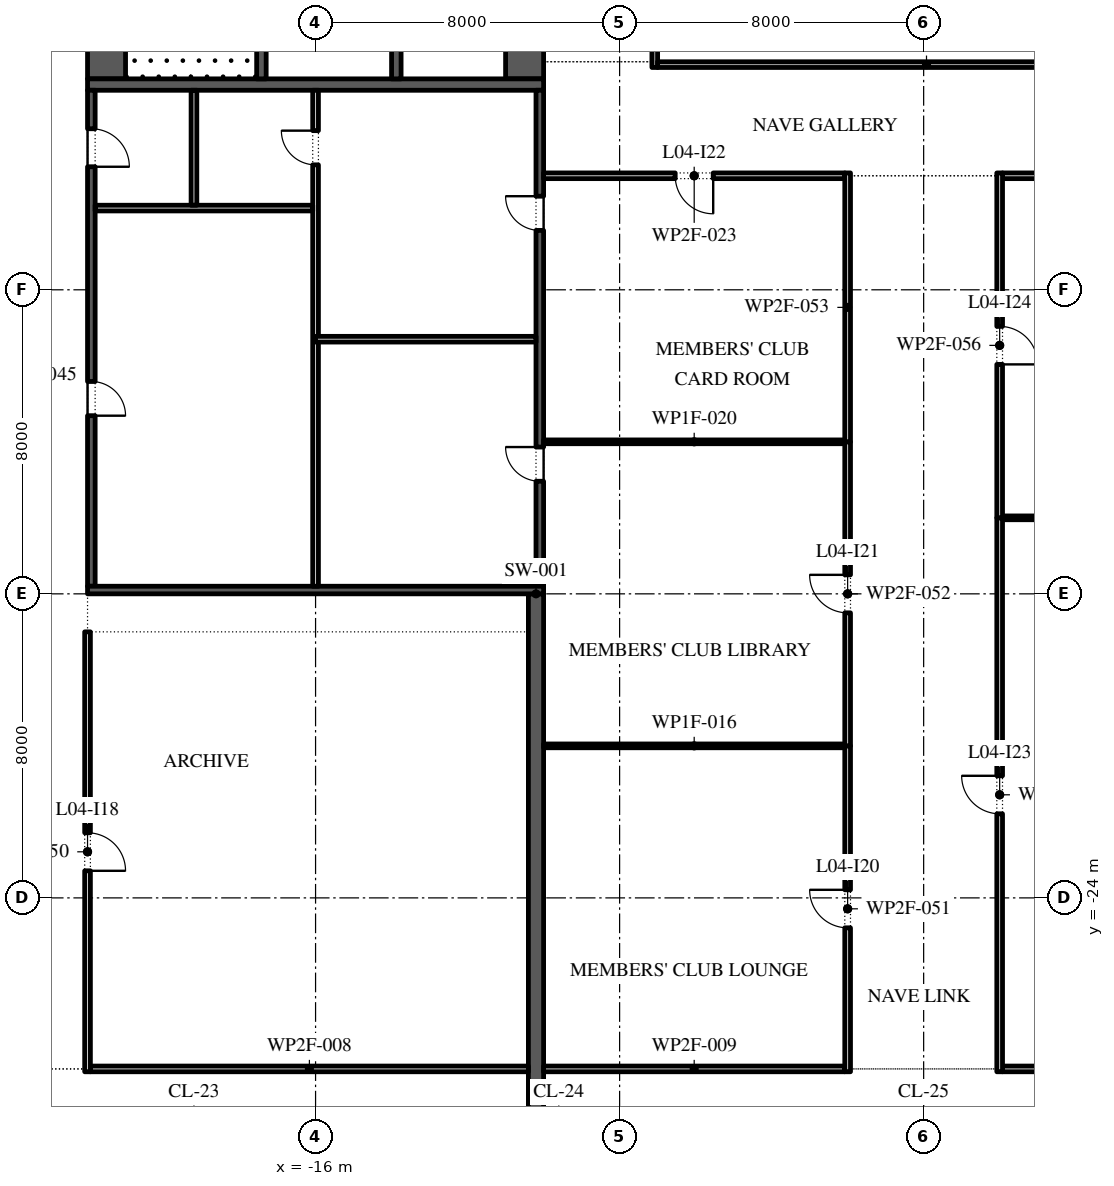
"""IFC4 building model, lengths in metres.
Left out: names, types, materials, properties, quantities, classifications, styles, units other than length and angle.
Written with IfcOpenShell. Run it as: python <this file> out.ifc"""

import sys

from ifc_helpers import new_model, si_unit, direction, frame, frame_2d, origin, place, context, subcontext, project, spatial, rectangle, extrude, element, fill, save


model = new_model("IFC4")
c1 = context("Model", 3, precision=1e-05, world=origin(), true_north=direction((0.0, 1.0)))
c2 = subcontext(c1, "Body", "Model", "MODEL_VIEW")
j1 = project(units=[si_unit("LENGTHUNIT", "METRE"), si_unit("PLANEANGLEUNIT", "RADIAN")], contexts=[c1])
p1 = place(None, origin())
s1 = spatial("IfcSite", under=j1, at=p1, CompositionType="ELEMENT")
p2 = place(p1, origin())
s2 = spatial("IfcBuilding", under=s1, at=p2, CompositionType="ELEMENT")
p3 = place(p2, frame((0.0, 0.0, 24.0)))
s3 = spatial("IfcBuildingStorey", under=s2, at=p3, CompositionType="ELEMENT", Elevation=24.0)
p4 = place(p3, frame((-10.2, -31.0, 0.0), z_axis=(0.0, 0.0, 1.0), x_axis=(0.0, 1.0, 0.0)))
e1 = element("IfcWall", 1, at=p4, inside=s3, PredefinedType="SHEAR", context=c2, shape_type="SweptSolid", body=[
    extrude(rectangle(XDim=15.0, YDim=0.4, at=frame_2d((7.5, 0.0))), origin(), (0.0, 0.0, 1.0), 4.5),
])
p5 = place(p3, frame((-7.075, -2.15, 0.0), z_axis=(0.0, 0.0, 1.0), x_axis=(0.0, 1.0, 0.0)))
e2 = element("IfcWall", 2, at=p5, inside=s3, PredefinedType="STANDARD", context=c2, shape_type="SweptSolid", body=[
    extrude(rectangle(XDim=18.3, YDim=0.15, at=frame_2d((9.15, 0.0))), origin(), (0.0, 0.0, 1.0), 4.5),
])
p6 = place(p3, frame((7.15, -2.075, 0.0), z_axis=(0.0, 0.0, 1.0), x_axis=(-1.0, 0.0, 0.0)))
e3 = element("IfcWall", 3, at=p6, inside=s3, PredefinedType="STANDARD", context=c2, shape_type="SweptSolid", body=[
    extrude(rectangle(XDim=14.15, YDim=0.15, at=frame_2d((7.075, 0.0))), origin(), (0.0, 0.0, 1.0), 3.52),
])
p7 = place(p3, frame((-21.5, -2.45, 0.0), z_axis=(0.0, 0.0, 1.0), x_axis=(0.0, 1.0, 0.0)))
e4 = element("IfcWall", 4, at=p7, inside=s3, PredefinedType="SHEAR", context=c2, shape_type="SweptSolid", body=[
    extrude(rectangle(XDim=27.9, YDim=1.0, at=frame_2d((13.95, 0.0))), origin(), (0.0, 0.0, 1.0), 4.5),
])
p8 = place(p7, frame((5.05, 0.0, 0.0)))
e5 = element("IfcOpeningElement", 5, at=p8, cuts=e4, PredefinedType="OPENING", context=c2, shape_type="SweptSolid", body=[
    extrude(rectangle(XDim=1.2, YDim=2.1, at=frame_2d((0.6, 1.05))), frame((0.0, 0.51, 0.0), z_axis=(0.0, -1.0, 0.0), x_axis=(1.0, 0.0, 0.0)), (0.0, 0.0, 1.0), 1.02),
])
p9 = place(p7, frame((21.65, 0.0, 0.0)))
e6 = element("IfcOpeningElement", 6, at=p9, cuts=e4, PredefinedType="OPENING", context=c2, shape_type="SweptSolid", body=[
    extrude(rectangle(XDim=1.2, YDim=2.1, at=frame_2d((0.6, 1.05))), frame((0.0, 0.51, 0.0), z_axis=(0.0, -1.0, 0.0), x_axis=(1.0, 0.0, 0.0)), (0.0, 0.0, 1.0), 1.02),
])
p10 = place(p3, frame((-10.5, -2.45, 0.0), z_axis=(0.0, 0.0, 1.0), x_axis=(0.0, 1.0, 0.0)))
e7 = element("IfcWall", 7, at=p10, inside=s3, PredefinedType="SHEAR", context=c2, shape_type="SweptSolid", body=[
    extrude(rectangle(XDim=27.9, YDim=1.0, at=frame_2d((13.95, 0.0))), origin(), (0.0, 0.0, 1.0), 4.5),
])
p11 = place(p10, frame((23.65, 0.0, 0.0)))
e8 = element("IfcOpeningElement", 8, at=p11, cuts=e7, PredefinedType="OPENING", context=c2, shape_type="SweptSolid", body=[
    extrude(rectangle(XDim=2.4, YDim=2.1, at=frame_2d((1.2, 1.05))), frame((0.0, 0.51, 0.0), z_axis=(0.0, -1.0, 0.0), x_axis=(1.0, 0.0, 0.0)), (0.0, 0.0, 1.0), 1.02),
])
p12 = place(p10, frame((1.087, 0.0, 0.0)))
e9 = element("IfcOpeningElement", 9, at=p12, cuts=e7, PredefinedType="OPENING", context=c2, shape_type="SweptSolid", body=[
    extrude(rectangle(XDim=0.9, YDim=2.1, at=frame_2d((0.45, 1.05))), frame((0.0, 0.51, 0.0), z_axis=(0.0, -1.0, 0.0), x_axis=(1.0, 0.0, 0.0)), (0.0, 0.0, 1.0), 1.02),
])
p13 = place(p10, frame((4.312, 0.0, 0.0)))
e10 = element("IfcOpeningElement", 10, at=p13, cuts=e7, PredefinedType="OPENING", context=c2, shape_type="SweptSolid", body=[
    extrude(rectangle(XDim=0.9, YDim=2.1, at=frame_2d((0.45, 1.05))), frame((0.0, 0.51, 0.0), z_axis=(0.0, -1.0, 0.0), x_axis=(1.0, 0.0, 0.0)), (0.0, 0.0, 1.0), 1.02),
])
p14 = place(p3, frame((-22.0, -2.6, 0.0), z_axis=(0.0, 0.0, 1.0), x_axis=(1.0, 0.0, 0.0)))
e11 = element("IfcWall", 11, at=p14, inside=s3, PredefinedType="SHEAR", context=c2, shape_type="SweptSolid", body=[
    extrude(rectangle(XDim=12.0, YDim=0.3, at=frame_2d((6.0, 0.0))), origin(), (0.0, 0.0, 1.0), 4.5),
])
p15 = place(p3, frame((-17.425, -2.45, 0.0), z_axis=(0.0, 0.0, 1.0), x_axis=(0.0, 1.0, 0.0)))
e12 = element("IfcWall", 12, at=p15, inside=s3, PredefinedType="SHEAR", context=c2, shape_type="SweptSolid", body=[
    extrude(rectangle(XDim=6.3, YDim=0.25, at=frame_2d((3.15, 0.0))), origin(), (0.0, 0.0, 1.0), 4.5),
])
p16 = place(p15, frame((5.05, 0.0, 0.0)))
e13 = element("IfcOpeningElement", 13, at=p16, cuts=e12, PredefinedType="OPENING", context=c2, shape_type="SweptSolid", body=[
    extrude(rectangle(XDim=1.2, YDim=2.1, at=frame_2d((0.6, 1.05))), frame((0.0, 0.135, 0.0), z_axis=(0.0, -1.0, 0.0), x_axis=(1.0, 0.0, 0.0)), (0.0, 0.0, 1.0), 0.27),
])
p17 = place(p3, frame((-13.875, -2.45, 0.0), z_axis=(0.0, 0.0, 1.0), x_axis=(0.0, 1.0, 0.0)))
e14 = element("IfcWall", 14, at=p17, inside=s3, PredefinedType="SHEAR", context=c2, shape_type="SweptSolid", body=[
    extrude(rectangle(XDim=21.3, YDim=0.25, at=frame_2d((10.65, 0.0))), origin(), (0.0, 0.0, 1.0), 4.5),
])
p18 = place(p17, frame((14.571, 0.0, 0.0)))
e15 = element("IfcOpeningElement", 15, at=p18, cuts=e14, PredefinedType="OPENING", context=c2, shape_type="SweptSolid", body=[
    extrude(rectangle(XDim=0.9, YDim=2.1, at=frame_2d((0.45, 1.05))), frame((0.0, 0.135, 0.0), z_axis=(0.0, -1.0, 0.0), x_axis=(1.0, 0.0, 0.0)), (0.0, 0.0, 1.0), 0.27),
])
p19 = place(p17, frame((6.971, 0.0, 0.0)))
e16 = element("IfcOpeningElement", 16, at=p19, cuts=e14, PredefinedType="OPENING", context=c2, shape_type="SweptSolid", body=[
    extrude(rectangle(XDim=1.1, YDim=2.1, at=frame_2d((0.55, 1.05))), frame((0.0, 0.135, 0.0), z_axis=(0.0, -1.0, 0.0), x_axis=(1.0, 0.0, 0.0)), (0.0, 0.0, 1.0), 0.27),
])
p20 = place(p3, frame((-21.9, -15.8, 0.0), z_axis=(0.0, 0.0, 1.0), x_axis=(0.0, 1.0, 0.0)))
e17 = element("IfcWall", 17, at=p20, inside=s3, PredefinedType="SHEAR", context=c2, shape_type="SweptSolid", body=[
    extrude(rectangle(XDim=13.05, YDim=0.2, at=frame_2d((6.525, 0.0))), origin(), (0.0, 0.0, 1.0), 4.5),
])
p21 = place(p20, frame((4.488, 0.0, 0.0)))
e18 = element("IfcOpeningElement", 18, at=p21, cuts=e17, PredefinedType="OPENING", context=c2, shape_type="SweptSolid", body=[
    extrude(rectangle(XDim=0.9, YDim=2.1, at=frame_2d((0.45, 1.05))), frame((0.0, 0.11, 0.0), z_axis=(0.0, -1.0, 0.0), x_axis=(1.0, 0.0, 0.0)), (0.0, 0.0, 1.0), 0.22),
])
p22 = place(p20, frame((11.038, 0.0, 0.0)))
e19 = element("IfcOpeningElement", 19, at=p22, cuts=e17, PredefinedType="OPENING", context=c2, shape_type="SweptSolid", body=[
    extrude(rectangle(XDim=1.0, YDim=2.1, at=frame_2d((0.5, 1.05))), frame((0.0, 0.11, 0.0), z_axis=(0.0, -1.0, 0.0), x_axis=(1.0, 0.0, 0.0)), (0.0, 0.0, 1.0), 0.22),
])
p23 = place(p3, frame((-10.1, -15.8, 0.0), z_axis=(0.0, 0.0, 1.0), x_axis=(0.0, 1.0, 0.0)))
e20 = element("IfcWall", 20, at=p23, inside=s3, PredefinedType="SHEAR", context=c2, shape_type="SweptSolid", body=[
    extrude(rectangle(XDim=13.05, YDim=0.2, at=frame_2d((6.525, 0.0))), origin(), (0.0, 0.0, 1.0), 4.5),
])
p24 = place(p23, frame((2.762, 0.0, 0.0)))
e21 = element("IfcOpeningElement", 21, at=p24, cuts=e20, PredefinedType="OPENING", context=c2, shape_type="SweptSolid", body=[
    extrude(rectangle(XDim=0.9, YDim=2.1, at=frame_2d((0.45, 1.05))), frame((0.0, 0.11, 0.0), z_axis=(0.0, -1.0, 0.0), x_axis=(1.0, 0.0, 0.0)), (0.0, 0.0, 1.0), 0.22),
])
p25 = place(p23, frame((9.363, 0.0, 0.0)))
e22 = element("IfcOpeningElement", 22, at=p25, cuts=e20, PredefinedType="OPENING", context=c2, shape_type="SweptSolid", body=[
    extrude(rectangle(XDim=0.9, YDim=2.1, at=frame_2d((0.45, 1.05))), frame((0.0, 0.11, 0.0), z_axis=(0.0, -1.0, 0.0), x_axis=(1.0, 0.0, 0.0)), (0.0, 0.0, 1.0), 0.22),
])
p26 = place(p3, frame((-22.0, -15.9, 0.0), z_axis=(0.0, 0.0, 1.0), x_axis=(1.0, 0.0, 0.0)))
e23 = element("IfcWall", 23, at=p26, inside=s3, PredefinedType="SHEAR", context=c2, shape_type="SweptSolid", body=[
    extrude(rectangle(XDim=12.0, YDim=0.2, at=frame_2d((6.0, 0.0))), origin(), (0.0, 0.0, 1.0), 4.5),
])
p27 = place(p3, frame((-16.0, -15.8, 0.0), z_axis=(0.0, 0.0, 1.0), x_axis=(0.0, 1.0, 0.0)))
e24 = element("IfcWall", 24, at=p27, inside=s3, PredefinedType="PARTITIONING", context=c2, shape_type="SweptSolid", body=[
    extrude(rectangle(XDim=13.05, YDim=0.15, at=frame_2d((6.525, 0.0))), origin(), (0.0, 0.0, 1.0), 4.5),
])
p28 = place(p27, frame((11.087, 0.0, 0.0)))
e25 = element("IfcOpeningElement", 25, at=p28, cuts=e24, PredefinedType="OPENING", context=c2, shape_type="SweptSolid", body=[
    extrude(rectangle(XDim=0.9, YDim=2.1, at=frame_2d((0.45, 1.05))), frame((0.0, 0.085, 0.0), z_axis=(0.0, -1.0, 0.0), x_axis=(1.0, 0.0, 0.0)), (0.0, 0.0, 1.0), 0.17),
])
p29 = place(p3, frame((-16.0, -9.3, 0.0), z_axis=(0.0, 0.0, 1.0), x_axis=(1.0, 0.0, 0.0)))
e26 = element("IfcWall", 26, at=p29, inside=s3, PredefinedType="PARTITIONING", context=c2, shape_type="SweptSolid", body=[
    extrude(rectangle(XDim=5.8, YDim=0.15, at=frame_2d((2.9, 0.0))), origin(), (0.0, 0.0, 1.0), 4.5),
])
p30 = place(p3, frame((-21.8, -5.85, 0.0), z_axis=(0.0, 0.0, 1.0), x_axis=(1.0, 0.0, 0.0)))
e27 = element("IfcWall", 27, at=p30, inside=s3, PredefinedType="PARTITIONING", context=c2, shape_type="SweptSolid", body=[
    extrude(rectangle(XDim=5.725, YDim=0.15, at=frame_2d((2.863, 0.0))), origin(), (0.0, 0.0, 1.0), 4.5),
])
p31 = place(p3, frame((-19.2, -5.775, 0.0), z_axis=(0.0, 0.0, 1.0), x_axis=(0.0, 1.0, 0.0)))
e28 = element("IfcWall", 28, at=p31, inside=s3, PredefinedType="PARTITIONING", context=c2, shape_type="SweptSolid", body=[
    extrude(rectangle(XDim=3.025, YDim=0.15, at=frame_2d((1.512, 0.0))), origin(), (0.0, 0.0, 1.0), 4.5),
])
p32 = place(p3, frame((-21.925, -28.5, 0.0), z_axis=(0.0, 0.0, 1.0), x_axis=(1.0, 0.0, 0.0)))
e29 = element("IfcWall", 29, at=p32, inside=s3, PredefinedType="PARTITIONING", context=c2, shape_type="SweptSolid", body=[
    extrude(rectangle(XDim=11.525, YDim=0.15, at=frame_2d((5.763, 0.0))), origin(), (0.0, 0.0, 1.0), 4.5),
])
for number, where, z_axis, x_axis in (
    (30, (-10.0, -28.5, 0.0), (0.0, 0.0, 1.0), (1.0, 0.0, 0.0)),
    (31, (2.075, -28.5, 0.0), (0.0, 0.0, 1.0), (1.0, 0.0, 0.0)),
):
    element("IfcWall", number, at=place(p3, frame(where, z_axis=z_axis, x_axis=x_axis)), inside=s3, PredefinedType="PARTITIONING", context=c2, shape_type="SweptSolid", body=[
        extrude(rectangle(XDim=7.925, YDim=0.15, at=frame_2d((3.962, 0.0))), origin(), (0.0, 0.0, 1.0), 4.5),
    ])
for number, where, z_axis, x_axis in (
    (32, (-10.0, -20.0, 0.0), (0.0, 0.0, 1.0), (1.0, 0.0, 0.0)),
    (33, (2.075, -14.0, 0.0), (0.0, 0.0, 1.0), (1.0, 0.0, 0.0)),
    (34, (-10.0, -12.0, 0.0), (0.0, 0.0, 1.0), (1.0, 0.0, 0.0)),
):
    element("IfcWall", number, at=place(p3, frame(where, z_axis=z_axis, x_axis=x_axis)), inside=s3, PredefinedType="PARTITIONING", context=c2, shape_type="SweptSolid", body=[
        extrude(rectangle(XDim=7.925, YDim=0.1, at=frame_2d((3.962, 0.0))), origin(), (0.0, 0.0, 1.0), 4.5),
    ])
p33 = place(p3, frame((-10.0, -5.0, 0.0), z_axis=(0.0, 0.0, 1.0), x_axis=(1.0, 0.0, 0.0)))
e35 = element("IfcWall", 35, at=p33, inside=s3, PredefinedType="PARTITIONING", context=c2, shape_type="SweptSolid", body=[
    extrude(rectangle(XDim=7.925, YDim=0.15, at=frame_2d((3.962, 0.0))), origin(), (0.0, 0.0, 1.0), 4.5),
])
p34 = place(p33, frame((3.462, 0.0, 0.0)))
e36 = element("IfcOpeningElement", 36, at=p34, cuts=e35, PredefinedType="OPENING", context=c2, shape_type="SweptSolid", body=[
    extrude(rectangle(XDim=1.0, YDim=2.1, at=frame_2d((0.5, 1.05))), frame((0.0, 0.085, 0.0), z_axis=(0.0, -1.0, 0.0), x_axis=(1.0, 0.0, 0.0)), (0.0, 0.0, 1.0), 0.17),
])
p35 = place(p3, frame((2.075, -5.0, 0.0), z_axis=(0.0, 0.0, 1.0), x_axis=(1.0, 0.0, 0.0)))
e37 = element("IfcWall", 37, at=p35, inside=s3, PredefinedType="PARTITIONING", context=c2, shape_type="SweptSolid", body=[
    extrude(rectangle(XDim=7.925, YDim=0.15, at=frame_2d((3.962, 0.0))), origin(), (0.0, 0.0, 1.0), 4.5),
])
p36 = place(p3, frame((-22.0, -28.575, 0.0), z_axis=(0.0, 0.0, 1.0), x_axis=(0.0, 1.0, 0.0)))
e38 = element("IfcWall", 38, at=p36, inside=s3, PredefinedType="PARTITIONING", context=c2, shape_type="SweptSolid", body=[
    extrude(rectangle(XDim=11.575, YDim=0.15, at=frame_2d((5.788, 0.0))), origin(), (0.0, 0.0, 1.0), 4.5),
])
p37 = place(p36, frame((5.288, 0.0, 0.0)))
e39 = element("IfcOpeningElement", 39, at=p37, cuts=e38, PredefinedType="OPENING", context=c2, shape_type="SweptSolid", body=[
    extrude(rectangle(XDim=1.0, YDim=2.1, at=frame_2d((0.5, 1.05))), frame((0.0, 0.085, 0.0), z_axis=(0.0, -1.0, 0.0), x_axis=(1.0, 0.0, 0.0)), (0.0, 0.0, 1.0), 0.17),
])
p38 = place(p3, frame((-2.0, -28.575, 0.0), z_axis=(0.0, 0.0, 1.0), x_axis=(0.0, 1.0, 0.0)))
e40 = element("IfcWall", 40, at=p38, inside=s3, PredefinedType="PARTITIONING", context=c2, shape_type="SweptSolid", body=[
    extrude(rectangle(XDim=8.575, YDim=0.15, at=frame_2d((4.288, 0.0))), origin(), (0.0, 0.0, 1.0), 4.5),
])
p39 = place(p38, frame((3.788, 0.0, 0.0)))
e41 = element("IfcOpeningElement", 41, at=p39, cuts=e40, PredefinedType="OPENING", context=c2, shape_type="SweptSolid", body=[
    extrude(rectangle(XDim=1.0, YDim=2.1, at=frame_2d((0.5, 1.05))), frame((0.0, 0.085, 0.0), z_axis=(0.0, -1.0, 0.0), x_axis=(1.0, 0.0, 0.0)), (0.0, 0.0, 1.0), 0.17),
])
p40 = place(p3, frame((-2.0, -20.0, 0.0), z_axis=(0.0, 0.0, 1.0), x_axis=(0.0, 1.0, 0.0)))
e42 = element("IfcWall", 42, at=p40, inside=s3, PredefinedType="PARTITIONING", context=c2, shape_type="SweptSolid", body=[
    extrude(rectangle(XDim=8.0, YDim=0.15, at=frame_2d((4.0, 0.0))), origin(), (0.0, 0.0, 1.0), 4.5),
])
p41 = place(p40, frame((3.5, 0.0, 0.0)))
e43 = element("IfcOpeningElement", 43, at=p41, cuts=e42, PredefinedType="OPENING", context=c2, shape_type="SweptSolid", body=[
    extrude(rectangle(XDim=1.0, YDim=2.1, at=frame_2d((0.5, 1.05))), frame((0.0, 0.085, 0.0), z_axis=(0.0, -1.0, 0.0), x_axis=(1.0, 0.0, 0.0)), (0.0, 0.0, 1.0), 0.17),
])
p42 = place(p3, frame((-2.0, -12.0, 0.0), z_axis=(0.0, 0.0, 1.0), x_axis=(0.0, 1.0, 0.0)))
e44 = element("IfcWall", 44, at=p42, inside=s3, PredefinedType="PARTITIONING", context=c2, shape_type="SweptSolid", body=[
    extrude(rectangle(XDim=7.075, YDim=0.15, at=frame_2d((3.538, 0.0))), origin(), (0.0, 0.0, 1.0), 4.5),
])
p43 = place(p3, frame((2.0, -28.575, 0.0), z_axis=(0.0, 0.0, 1.0), x_axis=(0.0, 1.0, 0.0)))
e45 = element("IfcWall", 45, at=p43, inside=s3, PredefinedType="PARTITIONING", context=c2, shape_type="SweptSolid", body=[
    extrude(rectangle(XDim=14.575, YDim=0.15, at=frame_2d((7.288, 0.0))), origin(), (0.0, 0.0, 1.0), 4.5),
])
p44 = place(p43, frame((6.788, 0.0, 0.0)))
e46 = element("IfcOpeningElement", 46, at=p44, cuts=e45, PredefinedType="OPENING", context=c2, shape_type="SweptSolid", body=[
    extrude(rectangle(XDim=1.0, YDim=2.1, at=frame_2d((0.5, 1.05))), frame((0.0, 0.085, 0.0), z_axis=(0.0, -1.0, 0.0), x_axis=(1.0, 0.0, 0.0)), (0.0, 0.0, 1.0), 0.17),
])
p45 = place(p3, frame((2.0, -14.0, 0.0), z_axis=(0.0, 0.0, 1.0), x_axis=(0.0, 1.0, 0.0)))
e47 = element("IfcWall", 47, at=p45, inside=s3, PredefinedType="PARTITIONING", context=c2, shape_type="SweptSolid", body=[
    extrude(rectangle(XDim=9.075, YDim=0.15, at=frame_2d((4.538, 0.0))), origin(), (0.0, 0.0, 1.0), 4.5),
])
p46 = place(p45, frame((4.038, 0.0, 0.0)))
e48 = element("IfcOpeningElement", 48, at=p46, cuts=e47, PredefinedType="OPENING", context=c2, shape_type="SweptSolid", body=[
    extrude(rectangle(XDim=1.0, YDim=2.1, at=frame_2d((0.5, 1.05))), frame((0.0, 0.085, 0.0), z_axis=(0.0, -1.0, 0.0), x_axis=(1.0, 0.0, 0.0)), (0.0, 0.0, 1.0), 0.17),
])
p47 = place(p21, frame((0.9, -0.15, 0.0), z_axis=(0.0, 0.0, 1.0), x_axis=(-1.0, 0.0, 0.0)))
e49 = element("IfcDoor", 49, at=p47, inside=s3, OperationType="SINGLE_SWING_LEFT", PredefinedType="DOOR", context=c2, shape_type="SweptSolid", body=[
    extrude(rectangle(XDim=0.9, YDim=2.1, at=frame_2d((0.45, 1.05))), frame((0.0, -0.05, 0.0), z_axis=(0.0, -1.0, 0.0), x_axis=(1.0, 0.0, 0.0)), (0.0, 0.0, 1.0), 0.05),
])
fill(e18, e49)
p48 = place(p22, frame((1.0, -0.15, 0.0), z_axis=(0.0, 0.0, 1.0), x_axis=(-1.0, 0.0, 0.0)))
e50 = element("IfcDoor", 50, at=p48, inside=s3, OperationType="SINGLE_SWING_LEFT", PredefinedType="DOOR", context=c2, shape_type="SweptSolid", body=[
    extrude(rectangle(XDim=1.0, YDim=2.1, at=frame_2d((0.5, 1.05))), frame((0.0, -0.05, 0.0), z_axis=(0.0, -1.0, 0.0), x_axis=(1.0, 0.0, 0.0)), (0.0, 0.0, 1.0), 0.05),
])
fill(e19, e50)
p49 = place(p28, origin())
e51 = element("IfcDoor", 51, at=p49, inside=s3, OperationType="SINGLE_SWING_LEFT", PredefinedType="DOOR", context=c2, shape_type="SweptSolid", body=[
    extrude(rectangle(XDim=0.9, YDim=2.1, at=frame_2d((0.45, 1.05))), frame((0.0, 0.025, 0.0), z_axis=(0.0, -1.0, 0.0), x_axis=(1.0, 0.0, 0.0)), (0.0, 0.0, 1.0), 0.05),
])
fill(e25, e51)
p50 = place(p24, origin())
e52 = element("IfcDoor", 52, at=p50, inside=s3, OperationType="SINGLE_SWING_LEFT", PredefinedType="DOOR", context=c2, shape_type="SweptSolid", body=[
    extrude(rectangle(XDim=0.9, YDim=2.1, at=frame_2d((0.45, 1.05))), frame((0.0, 0.1, 0.0), z_axis=(0.0, -1.0, 0.0), x_axis=(1.0, 0.0, 0.0)), (0.0, 0.0, 1.0), 0.05),
])
fill(e21, e52)
p51 = place(p25, origin())
e53 = element("IfcDoor", 53, at=p51, inside=s3, OperationType="SINGLE_SWING_LEFT", PredefinedType="DOOR", context=c2, shape_type="SweptSolid", body=[
    extrude(rectangle(XDim=0.9, YDim=2.1, at=frame_2d((0.45, 1.05))), frame((0.0, 0.1, 0.0), z_axis=(0.0, -1.0, 0.0), x_axis=(1.0, 0.0, 0.0)), (0.0, 0.0, 1.0), 0.05),
])
fill(e22, e53)
p52 = place(p37, frame((1.0, 0.0, 0.0), z_axis=(0.0, 0.0, 1.0), x_axis=(-1.0, 0.0, 0.0)))
e54 = element("IfcDoor", 54, at=p52, inside=s3, OperationType="SINGLE_SWING_LEFT", PredefinedType="DOOR", context=c2, shape_type="SweptSolid", body=[
    extrude(rectangle(XDim=1.0, YDim=2.1, at=frame_2d((0.5, 1.05))), frame((0.0, 0.025, 0.0), z_axis=(0.0, -1.0, 0.0), x_axis=(1.0, 0.0, 0.0)), (0.0, 0.0, 1.0), 0.05),
])
fill(e39, e54)
p53 = place(p39, origin())
e55 = element("IfcDoor", 55, at=p53, inside=s3, OperationType="SINGLE_SWING_LEFT", PredefinedType="DOOR", context=c2, shape_type="SweptSolid", body=[
    extrude(rectangle(XDim=1.0, YDim=2.1, at=frame_2d((0.5, 1.05))), frame((0.0, 0.025, 0.0), z_axis=(0.0, -1.0, 0.0), x_axis=(1.0, 0.0, 0.0)), (0.0, 0.0, 1.0), 0.05),
])
fill(e41, e55)
p54 = place(p41, origin())
e56 = element("IfcDoor", 56, at=p54, inside=s3, OperationType="SINGLE_SWING_LEFT", PredefinedType="DOOR", context=c2, shape_type="SweptSolid", body=[
    extrude(rectangle(XDim=1.0, YDim=2.1, at=frame_2d((0.5, 1.05))), frame((0.0, 0.025, 0.0), z_axis=(0.0, -1.0, 0.0), x_axis=(1.0, 0.0, 0.0)), (0.0, 0.0, 1.0), 0.05),
])
fill(e43, e56)
p55 = place(p34, frame((1.0, 0.0, 0.0), z_axis=(0.0, 0.0, 1.0), x_axis=(-1.0, 0.0, 0.0)))
e57 = element("IfcDoor", 57, at=p55, inside=s3, OperationType="SINGLE_SWING_RIGHT", PredefinedType="DOOR", context=c2, shape_type="SweptSolid", body=[
    extrude(rectangle(XDim=1.0, YDim=2.1, at=frame_2d((0.5, 1.05))), frame((0.0, 0.025, 0.0), z_axis=(0.0, -1.0, 0.0), x_axis=(1.0, 0.0, 0.0)), (0.0, 0.0, 1.0), 0.05),
])
fill(e36, e57)
p56 = place(p44, origin())
e58 = element("IfcDoor", 58, at=p56, inside=s3, OperationType="SINGLE_SWING_LEFT", PredefinedType="DOOR", context=c2, shape_type="SweptSolid", body=[
    extrude(rectangle(XDim=1.0, YDim=2.1, at=frame_2d((0.5, 1.05))), frame((0.0, 0.025, 0.0), z_axis=(0.0, -1.0, 0.0), x_axis=(1.0, 0.0, 0.0)), (0.0, 0.0, 1.0), 0.05),
])
fill(e46, e58)
p57 = place(p46, frame((1.0, 0.0, 0.0), z_axis=(0.0, 0.0, 1.0), x_axis=(-1.0, 0.0, 0.0)))
e59 = element("IfcDoor", 59, at=p57, inside=s3, OperationType="SINGLE_SWING_LEFT", PredefinedType="DOOR", context=c2, shape_type="SweptSolid", body=[
    extrude(rectangle(XDim=1.0, YDim=2.1, at=frame_2d((0.5, 1.05))), frame((0.0, 0.025, 0.0), z_axis=(0.0, -1.0, 0.0), x_axis=(1.0, 0.0, 0.0)), (0.0, 0.0, 1.0), 0.05),
])
fill(e48, e59)
save(model, sys.argv[1])
